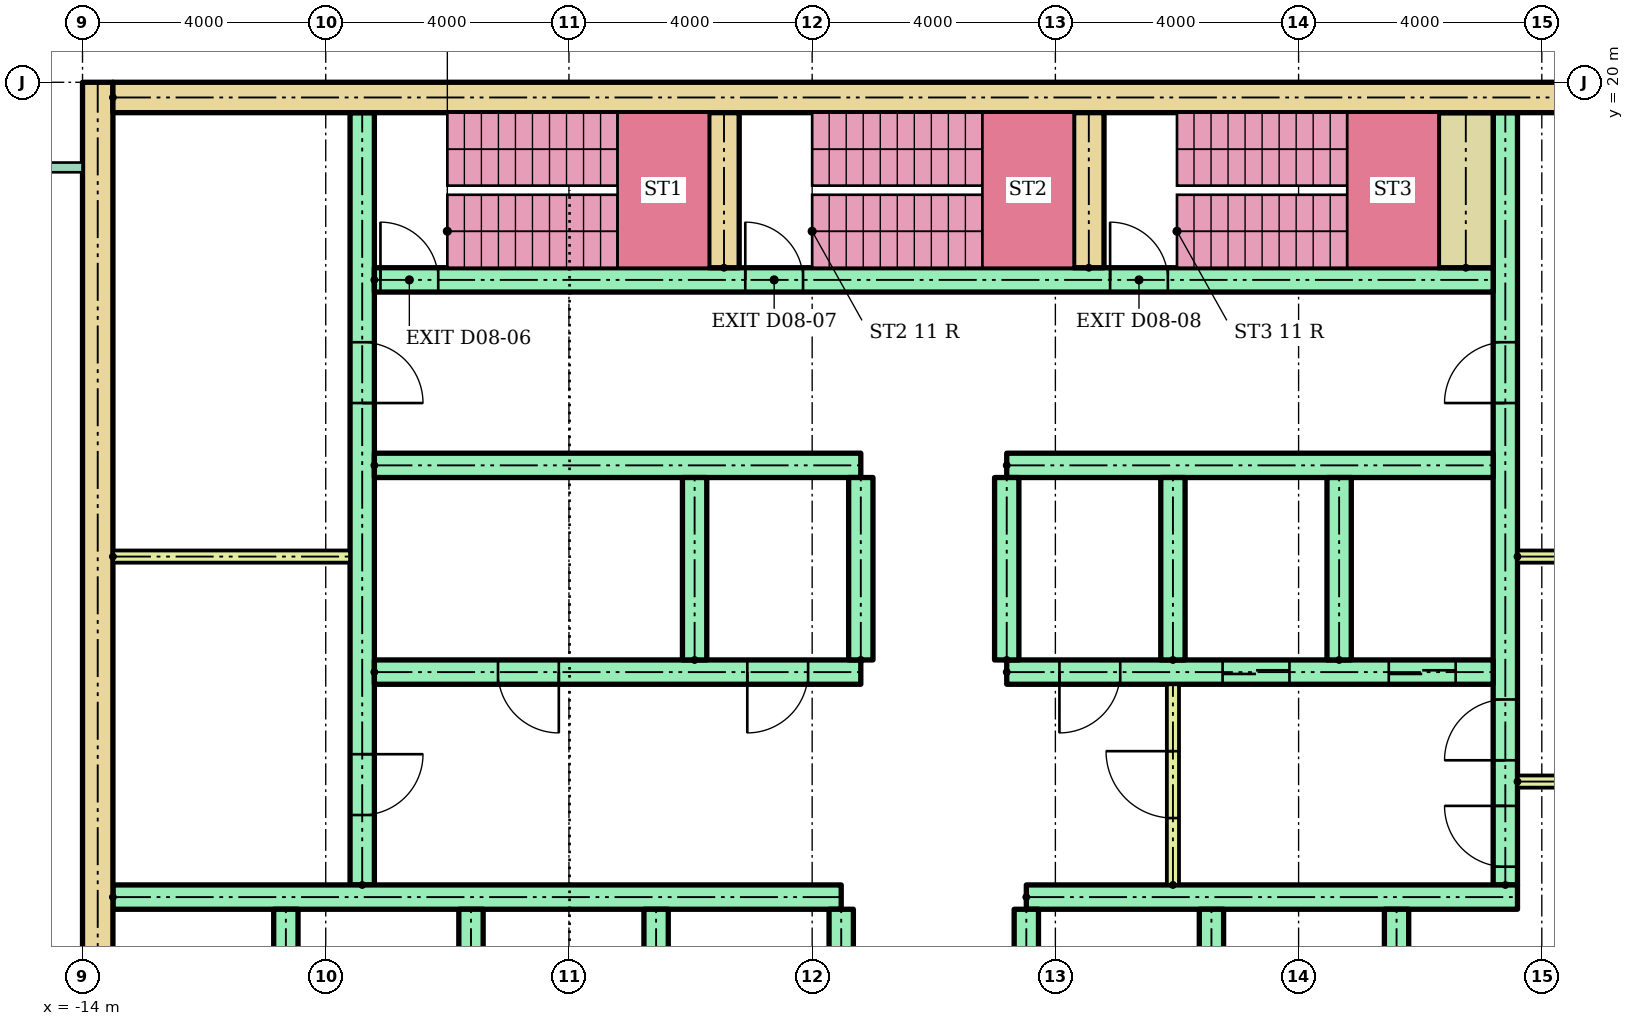
"""IFC4 building model, lengths in metres.
Left out: names, types, materials, properties, quantities, classifications, styles, units other than length and angle.
Written with IfcOpenShell. Run it as: python <this file> out.ifc"""

import sys

from ifc_helpers import new_model, si_unit, direction, frame, frame_2d, origin, place, context, subcontext, project, spatial, rectangle, extrude, element, fill, save


model = new_model("IFC4")
c1 = context("Model", 3, precision=1e-05, world=origin(), true_north=direction((0.0, 1.0)))
c2 = subcontext(c1, "Body", "Model", "MODEL_VIEW")
j1 = project(units=[si_unit("LENGTHUNIT", "METRE"), si_unit("PLANEANGLEUNIT", "RADIAN")], contexts=[c1])
p1 = place(None, origin())
s1 = spatial("IfcSite", under=j1, at=p1, CompositionType="ELEMENT")
p2 = place(p1, origin())
s2 = spatial("IfcBuilding", under=s1, at=p2, CompositionType="ELEMENT")
p3 = place(p2, frame((0.0, 0.0, 33.8)))
s3 = spatial("IfcBuildingStorey", under=s2, at=p3, CompositionType="ELEMENT", Elevation=33.8)
p4 = place(p3, frame((-13.75, 3.0, 0.0), z_axis=(0.0, 0.0, 1.0), x_axis=(0.0, 1.0, 0.0)))
e1 = element("IfcWall", 1, at=p4, inside=s3, PredefinedType="SHEAR", context=c2, shape_type="SweptSolid", body=[
    extrude(rectangle(XDim=17.0, YDim=0.5, at=frame_2d((8.5, 0.0))), origin(), (0.0, 0.0, 1.0), 3.6),
])
p5 = place(p3, frame((-13.5, 19.75, 0.0)))
e2 = element("IfcWall", 2, at=p5, inside=s3, PredefinedType="SHEAR", context=c2, shape_type="SweptSolid", body=[
    extrude(rectangle(XDim=27.0, YDim=0.5, at=frame_2d((13.5, 0.0))), origin(), (0.0, 0.0, 1.0), 3.6),
])
p6 = place(p3, frame((-9.4, 6.8, 0.0), z_axis=(0.0, 0.0, 1.0), x_axis=(0.0, 1.0, 0.0)))
e3 = element("IfcWall", 3, at=p6, inside=s3, PredefinedType="SHEAR", context=c2, shape_type="SweptSolid", body=[
    extrude(rectangle(XDim=12.7, YDim=0.4, at=frame_2d((6.35, 0.0))), origin(), (0.0, 0.0, 1.0), 3.6),
])
p7 = place(p6, frame((1.15, 0.0, 0.0)))
e4 = element("IfcOpeningElement", 4, at=p7, cuts=e3, PredefinedType="OPENING", context=c2, shape_type="SweptSolid", body=[
    extrude(rectangle(XDim=1.0, YDim=2.1, at=frame_2d((0.5, 1.05))), frame((0.0, 0.21, 0.0), z_axis=(0.0, -1.0, 0.0), x_axis=(1.0, 0.0, 0.0)), (0.0, 0.0, 1.0), 0.42),
])
p8 = place(p6, frame((7.925, 0.0, 0.0)))
e5 = element("IfcOpeningElement", 5, at=p8, cuts=e3, PredefinedType="OPENING", context=c2, shape_type="SweptSolid", body=[
    extrude(rectangle(XDim=1.0, YDim=2.1, at=frame_2d((0.5, 1.05))), frame((0.0, 0.21, 0.0), z_axis=(0.0, -1.0, 0.0), x_axis=(1.0, 0.0, 0.0)), (0.0, 0.0, 1.0), 0.42),
])
p9 = place(p3, frame((9.4, 6.8, 0.0), z_axis=(0.0, 0.0, 1.0), x_axis=(0.0, 1.0, 0.0)))
e6 = element("IfcWall", 6, at=p9, inside=s3, PredefinedType="SHEAR", context=c2, shape_type="SweptSolid", body=[
    extrude(rectangle(XDim=12.7, YDim=0.4, at=frame_2d((6.35, 0.0))), origin(), (0.0, 0.0, 1.0), 3.6),
])
p10 = place(p9, frame((0.3, 0.0, 0.0)))
e7 = element("IfcOpeningElement", 7, at=p10, cuts=e6, PredefinedType="OPENING", context=c2, shape_type="SweptSolid", body=[
    extrude(rectangle(XDim=1.0, YDim=2.1, at=frame_2d((0.5, 1.05))), frame((0.0, 0.21, 0.0), z_axis=(0.0, -1.0, 0.0), x_axis=(1.0, 0.0, 0.0)), (0.0, 0.0, 1.0), 0.42),
])
p11 = place(p9, frame((2.05, 0.0, 0.0)))
e8 = element("IfcOpeningElement", 8, at=p11, cuts=e6, PredefinedType="OPENING", context=c2, shape_type="SweptSolid", body=[
    extrude(rectangle(XDim=1.0, YDim=2.1, at=frame_2d((0.5, 1.05))), frame((0.0, 0.21, 0.0), z_axis=(0.0, -1.0, 0.0), x_axis=(1.0, 0.0, 0.0)), (0.0, 0.0, 1.0), 0.42),
])
p12 = place(p9, frame((7.925, 0.0, 0.0)))
e9 = element("IfcOpeningElement", 9, at=p12, cuts=e6, PredefinedType="OPENING", context=c2, shape_type="SweptSolid", body=[
    extrude(rectangle(XDim=1.0, YDim=2.1, at=frame_2d((0.5, 1.05))), frame((0.0, 0.21, 0.0), z_axis=(0.0, -1.0, 0.0), x_axis=(1.0, 0.0, 0.0)), (0.0, 0.0, 1.0), 0.42),
])
p13 = place(p3, frame((-13.5, 6.6, 0.0)))
e10 = element("IfcWall", 10, at=p13, inside=s3, PredefinedType="SHEAR", context=c2, shape_type="SweptSolid", body=[
    extrude(rectangle(XDim=11.978, YDim=0.4, at=frame_2d((5.989, 0.0))), origin(), (0.0, 0.0, 1.0), 3.6),
])
p14 = place(p3, frame((1.522, 6.6, 0.0)))
e11 = element("IfcWall", 11, at=p14, inside=s3, PredefinedType="SHEAR", context=c2, shape_type="SweptSolid", body=[
    extrude(rectangle(XDim=8.078, YDim=0.4, at=frame_2d((4.039, 0.0))), origin(), (0.0, 0.0, 1.0), 3.6),
])
for number, where, z_axis, x_axis in (
    (12, (-10.656, 3.4, 0.0), (0.0, 0.0, 1.0), (0.0, 1.0, 0.0)),
    (13, (-7.611, 3.4, 0.0), (0.0, 0.0, 1.0), (0.0, 1.0, 0.0)),
    (14, (-4.567, 3.4, 0.0), (0.0, 0.0, 1.0), (0.0, 1.0, 0.0)),
    (15, (-1.522, 3.4, 0.0), (0.0, 0.0, 1.0), (0.0, 1.0, 0.0)),
    (16, (1.522, 3.4, 0.0), (0.0, 0.0, 1.0), (0.0, 1.0, 0.0)),
    (17, (4.567, 3.4, 0.0), (0.0, 0.0, 1.0), (0.0, 1.0, 0.0)),
    (18, (7.611, 3.4, 0.0), (0.0, 0.0, 1.0), (0.0, 1.0, 0.0)),
):
    element("IfcWall", number, at=place(p3, frame(where, z_axis=z_axis, x_axis=x_axis)), inside=s3, PredefinedType="SHEAR", context=c2, shape_type="SweptSolid", body=[
        extrude(rectangle(XDim=3.0, YDim=0.4, at=frame_2d((1.5, 0.0))), origin(), (0.0, 0.0, 1.0), 3.6),
    ])
p15 = place(p3, frame((-9.2, 10.3, 0.0)))
e19 = element("IfcWall", 19, at=p15, inside=s3, PredefinedType="SHEAR", context=c2, shape_type="SweptSolid", body=[
    extrude(rectangle(XDim=8.0, YDim=0.4, at=frame_2d((4.0, 0.0))), origin(), (0.0, 0.0, 1.0), 3.6),
])
p16 = place(p15, frame((2.033, 0.0, 0.0)))
e20 = element("IfcOpeningElement", 20, at=p16, cuts=e19, PredefinedType="OPENING", context=c2, shape_type="SweptSolid", body=[
    extrude(rectangle(XDim=1.0, YDim=2.1, at=frame_2d((0.5, 1.05))), frame((0.0, 0.21, 0.0), z_axis=(0.0, -1.0, 0.0), x_axis=(1.0, 0.0, 0.0)), (0.0, 0.0, 1.0), 0.42),
])
p17 = place(p15, frame((6.133, 0.0, 0.0)))
e21 = element("IfcOpeningElement", 21, at=p17, cuts=e19, PredefinedType="OPENING", context=c2, shape_type="SweptSolid", body=[
    extrude(rectangle(XDim=1.0, YDim=2.1, at=frame_2d((0.5, 1.05))), frame((0.0, 0.21, 0.0), z_axis=(0.0, -1.0, 0.0), x_axis=(1.0, 0.0, 0.0)), (0.0, 0.0, 1.0), 0.42),
])
p18 = place(p3, frame((-9.2, 13.7, 0.0)))
e22 = element("IfcWall", 22, at=p18, inside=s3, PredefinedType="SHEAR", context=c2, shape_type="SweptSolid", body=[
    extrude(rectangle(XDim=8.0, YDim=0.4, at=frame_2d((4.0, 0.0))), origin(), (0.0, 0.0, 1.0), 3.6),
])
p19 = place(p3, frame((1.2, 10.3, 0.0)))
e23 = element("IfcWall", 23, at=p19, inside=s3, PredefinedType="SHEAR", context=c2, shape_type="SweptSolid", body=[
    extrude(rectangle(XDim=8.0, YDim=0.4, at=frame_2d((4.0, 0.0))), origin(), (0.0, 0.0, 1.0), 3.6),
])
p20 = place(p19, frame((3.55, 0.0, 0.0)))
e24 = element("IfcOpeningElement", 24, at=p20, cuts=e23, PredefinedType="OPENING", context=c2, shape_type="SweptSolid", body=[
    extrude(rectangle(XDim=1.1, YDim=2.1, at=frame_2d((0.55, 1.05))), frame((0.0, 0.21, 0.0), z_axis=(0.0, -1.0, 0.0), x_axis=(1.0, 0.0, 0.0)), (0.0, 0.0, 1.0), 0.42),
])
p21 = place(p19, frame((6.283, 0.0, 0.0)))
e25 = element("IfcOpeningElement", 25, at=p21, cuts=e23, PredefinedType="OPENING", context=c2, shape_type="SweptSolid", body=[
    extrude(rectangle(XDim=1.1, YDim=2.1, at=frame_2d((0.55, 1.05))), frame((0.0, 0.21, 0.0), z_axis=(0.0, -1.0, 0.0), x_axis=(1.0, 0.0, 0.0)), (0.0, 0.0, 1.0), 0.42),
])
p22 = place(p19, frame((0.867, 0.0, 0.0)))
e26 = element("IfcOpeningElement", 26, at=p22, cuts=e23, PredefinedType="OPENING", context=c2, shape_type="SweptSolid", body=[
    extrude(rectangle(XDim=1.0, YDim=2.1, at=frame_2d((0.5, 1.05))), frame((0.0, 0.21, 0.0), z_axis=(0.0, -1.0, 0.0), x_axis=(1.0, 0.0, 0.0)), (0.0, 0.0, 1.0), 0.42),
])
p23 = place(p3, frame((1.2, 13.7, 0.0)))
e27 = element("IfcWall", 27, at=p23, inside=s3, PredefinedType="SHEAR", context=c2, shape_type="SweptSolid", body=[
    extrude(rectangle(XDim=8.0, YDim=0.4, at=frame_2d((4.0, 0.0))), origin(), (0.0, 0.0, 1.0), 3.6),
])
for number, where, z_axis, x_axis in (
    (28, (-3.933, 10.5, 0.0), (0.0, 0.0, 1.0), (0.0, 1.0, 0.0)),
    (29, (-1.2, 10.5, 0.0), (0.0, 0.0, 1.0), (0.0, 1.0, 0.0)),
    (30, (1.2, 10.5, 0.0), (0.0, 0.0, 1.0), (0.0, 1.0, 0.0)),
    (31, (3.933, 10.5, 0.0), (0.0, 0.0, 1.0), (0.0, 1.0, 0.0)),
    (32, (6.667, 10.5, 0.0), (0.0, 0.0, 1.0), (0.0, 1.0, 0.0)),
):
    element("IfcWall", number, at=place(p3, frame(where, z_axis=z_axis, x_axis=x_axis)), inside=s3, PredefinedType="SHEAR", context=c2, shape_type="SweptSolid", body=[
        extrude(rectangle(XDim=3.0, YDim=0.4, at=frame_2d((1.5, 0.0))), origin(), (0.0, 0.0, 1.0), 3.6),
    ])
p24 = place(p3, frame((3.933, 6.8, 0.0), z_axis=(0.0, 0.0, 1.0), x_axis=(0.0, 1.0, 0.0)))
e33 = element("IfcWall", 33, at=p24, inside=s3, PredefinedType="PARTITIONING", context=c2, shape_type="SweptSolid", body=[
    extrude(rectangle(XDim=3.3, YDim=0.2, at=frame_2d((1.65, 0.0))), origin(), (0.0, 0.0, 1.0), 3.6),
])
p25 = place(p24, frame((1.1, 0.0, 0.0)))
e34 = element("IfcOpeningElement", 34, at=p25, cuts=e33, PredefinedType="OPENING", context=c2, shape_type="SweptSolid", body=[
    extrude(rectangle(XDim=1.1, YDim=2.1, at=frame_2d((0.55, 1.05))), frame((0.0, 0.11, 0.0), z_axis=(0.0, -1.0, 0.0), x_axis=(1.0, 0.0, 0.0)), (0.0, 0.0, 1.0), 0.22),
])
p26 = place(p3, frame((-9.2, 16.75, 0.0)))
e35 = element("IfcWall", 35, at=p26, inside=s3, PredefinedType="SHEAR", context=c2, shape_type="SweptSolid", body=[
    extrude(rectangle(XDim=18.4, YDim=0.4, at=frame_2d((9.2, 0.0))), origin(), (0.0, 0.0, 1.0), 3.6),
])
p27 = place(p26, frame((0.1, 0.0, 0.0)))
e36 = element("IfcOpeningElement", 36, at=p27, cuts=e35, PredefinedType="OPENING", context=c2, shape_type="SweptSolid", body=[
    extrude(rectangle(XDim=0.95, YDim=2.1, at=frame_2d((0.475, 1.05))), frame((0.0, 0.21, 0.0), z_axis=(0.0, -1.0, 0.0), x_axis=(1.0, 0.0, 0.0)), (0.0, 0.0, 1.0), 0.42),
])
p28 = place(p26, frame((6.1, 0.0, 0.0)))
e37 = element("IfcOpeningElement", 37, at=p28, cuts=e35, PredefinedType="OPENING", context=c2, shape_type="SweptSolid", body=[
    extrude(rectangle(XDim=0.95, YDim=2.1, at=frame_2d((0.475, 1.05))), frame((0.0, 0.21, 0.0), z_axis=(0.0, -1.0, 0.0), x_axis=(1.0, 0.0, 0.0)), (0.0, 0.0, 1.0), 0.42),
])
p29 = place(p26, frame((12.1, 0.0, 0.0)))
e38 = element("IfcOpeningElement", 38, at=p29, cuts=e35, PredefinedType="OPENING", context=c2, shape_type="SweptSolid", body=[
    extrude(rectangle(XDim=0.95, YDim=2.1, at=frame_2d((0.475, 1.05))), frame((0.0, 0.21, 0.0), z_axis=(0.0, -1.0, 0.0), x_axis=(1.0, 0.0, 0.0)), (0.0, 0.0, 1.0), 0.42),
])
for number, where, z_axis, x_axis in (
    (39, (-3.45, 16.95, 0.0), (0.0, 0.0, 1.0), (0.0, 1.0, 0.0)),
    (40, (2.55, 16.95, 0.0), (0.0, 0.0, 1.0), (0.0, 1.0, 0.0)),
):
    element("IfcWall", number, at=place(p3, frame(where, z_axis=z_axis, x_axis=x_axis)), inside=s3, PredefinedType="SHEAR", context=c2, shape_type="SweptSolid", body=[
        extrude(rectangle(XDim=2.55, YDim=0.5, at=frame_2d((1.275, 0.0))), origin(), (0.0, 0.0, 1.0), 3.6),
    ])
p30 = place(p3, frame((8.75, 16.95, 0.0), z_axis=(0.0, 0.0, 1.0), x_axis=(0.0, 1.0, 0.0)))
e41 = element("IfcWall", 41, at=p30, inside=s3, PredefinedType="SHEAR", context=c2, shape_type="SweptSolid", body=[
    extrude(rectangle(XDim=2.55, YDim=0.9, at=frame_2d((1.275, 0.0))), origin(), (0.0, 0.0, 1.0), 3.6),
])
for number, where in (
    (42, (-13.5, 12.2, 0.0)),
    (43, (9.6, 8.5, 0.0)),
    (44, (9.6, 12.2, 0.0)),
):
    element("IfcWall", number, at=place(p3, frame(where)), inside=s3, PredefinedType="PARTITIONING", context=c2, shape_type="SweptSolid", body=[
        extrude(rectangle(XDim=3.9, YDim=0.2, at=frame_2d((1.95, 0.0))), origin(), (0.0, 0.0, 1.0), 3.6),
    ])
p31 = place(p20, origin())
e45 = element("IfcDoor", 45, at=p31, inside=s3, OperationType="SLIDING_TO_LEFT", PredefinedType="DOOR", context=c2, shape_type="SweptSolid", body=[
    extrude(rectangle(XDim=1.1, YDim=2.1, at=frame_2d((0.55, 1.05))), frame((0.0, 0.025, 0.0), z_axis=(0.0, -1.0, 0.0), x_axis=(1.0, 0.0, 0.0)), (0.0, 0.0, 1.0), 0.05),
])
fill(e24, e45)
p32 = place(p21, origin())
e46 = element("IfcDoor", 46, at=p32, inside=s3, OperationType="SLIDING_TO_LEFT", PredefinedType="DOOR", context=c2, shape_type="SweptSolid", body=[
    extrude(rectangle(XDim=1.1, YDim=2.1, at=frame_2d((0.55, 1.05))), frame((0.0, 0.025, 0.0), z_axis=(0.0, -1.0, 0.0), x_axis=(1.0, 0.0, 0.0)), (0.0, 0.0, 1.0), 0.05),
])
fill(e25, e46)
p33 = place(p16, frame((1.0, 0.0, 0.0), z_axis=(0.0, 0.0, 1.0), x_axis=(-1.0, 0.0, 0.0)))
e47 = element("IfcDoor", 47, at=p33, inside=s3, OperationType="SINGLE_SWING_RIGHT", PredefinedType="DOOR", context=c2, shape_type="SweptSolid", body=[
    extrude(rectangle(XDim=1.0, YDim=2.1, at=frame_2d((0.5, 1.05))), frame((0.0, 0.025, 0.0), z_axis=(0.0, -1.0, 0.0), x_axis=(1.0, 0.0, 0.0)), (0.0, 0.0, 1.0), 0.05),
])
fill(e20, e47)
p34 = place(p17, frame((1.0, 0.0, 0.0), z_axis=(0.0, 0.0, 1.0), x_axis=(-1.0, 0.0, 0.0)))
e48 = element("IfcDoor", 48, at=p34, inside=s3, OperationType="SINGLE_SWING_LEFT", PredefinedType="DOOR", context=c2, shape_type="SweptSolid", body=[
    extrude(rectangle(XDim=1.0, YDim=2.1, at=frame_2d((0.5, 1.05))), frame((0.0, 0.025, 0.0), z_axis=(0.0, -1.0, 0.0), x_axis=(1.0, 0.0, 0.0)), (0.0, 0.0, 1.0), 0.05),
])
fill(e21, e48)
p35 = place(p22, frame((1.0, 0.0, 0.0), z_axis=(0.0, 0.0, 1.0), x_axis=(-1.0, 0.0, 0.0)))
e49 = element("IfcDoor", 49, at=p35, inside=s3, OperationType="SINGLE_SWING_LEFT", PredefinedType="DOOR", context=c2, shape_type="SweptSolid", body=[
    extrude(rectangle(XDim=1.0, YDim=2.1, at=frame_2d((0.5, 1.05))), frame((0.0, 0.025, 0.0), z_axis=(0.0, -1.0, 0.0), x_axis=(1.0, 0.0, 0.0)), (0.0, 0.0, 1.0), 0.05),
])
fill(e26, e49)
p36 = place(p25, origin())
e50 = element("IfcDoor", 50, at=p36, inside=s3, OperationType="SINGLE_SWING_RIGHT", PredefinedType="DOOR", context=c2, shape_type="SweptSolid", body=[
    extrude(rectangle(XDim=1.1, YDim=2.1, at=frame_2d((0.55, 1.05))), frame((0.0, 0.025, 0.0), z_axis=(0.0, -1.0, 0.0), x_axis=(1.0, 0.0, 0.0)), (0.0, 0.0, 1.0), 0.05),
])
fill(e34, e50)
p37 = place(p27, origin())
e51 = element("IfcDoor", 51, at=p37, inside=s3, OperationType="SINGLE_SWING_LEFT", PredefinedType="DOOR", context=c2, shape_type="SweptSolid", body=[
    extrude(rectangle(XDim=0.95, YDim=2.1, at=frame_2d((0.475, 1.05))), frame((0.0, 0.025, 0.0), z_axis=(0.0, -1.0, 0.0), x_axis=(1.0, 0.0, 0.0)), (0.0, 0.0, 1.0), 0.05),
])
fill(e36, e51)
p38 = place(p28, origin())
e52 = element("IfcDoor", 52, at=p38, inside=s3, OperationType="SINGLE_SWING_LEFT", PredefinedType="DOOR", context=c2, shape_type="SweptSolid", body=[
    extrude(rectangle(XDim=0.95, YDim=2.1, at=frame_2d((0.475, 1.05))), frame((0.0, 0.025, 0.0), z_axis=(0.0, -1.0, 0.0), x_axis=(1.0, 0.0, 0.0)), (0.0, 0.0, 1.0), 0.05),
])
fill(e37, e52)
p39 = place(p29, origin())
e53 = element("IfcDoor", 53, at=p39, inside=s3, OperationType="SINGLE_SWING_LEFT", PredefinedType="DOOR", context=c2, shape_type="SweptSolid", body=[
    extrude(rectangle(XDim=0.95, YDim=2.1, at=frame_2d((0.475, 1.05))), frame((0.0, 0.025, 0.0), z_axis=(0.0, -1.0, 0.0), x_axis=(1.0, 0.0, 0.0)), (0.0, 0.0, 1.0), 0.05),
])
fill(e38, e53)
p40 = place(p7, frame((1.0, 0.0, 0.0), z_axis=(0.0, 0.0, 1.0), x_axis=(-1.0, 0.0, 0.0)))
e54 = element("IfcDoor", 54, at=p40, inside=s3, OperationType="SINGLE_SWING_RIGHT", PredefinedType="DOOR", context=c2, shape_type="SweptSolid", body=[
    extrude(rectangle(XDim=1.0, YDim=2.1, at=frame_2d((0.5, 1.05))), frame((0.0, 0.025, 0.0), z_axis=(0.0, -1.0, 0.0), x_axis=(1.0, 0.0, 0.0)), (0.0, 0.0, 1.0), 0.05),
])
fill(e4, e54)
p41 = place(p8, frame((1.0, 0.0, 0.0), z_axis=(0.0, 0.0, 1.0), x_axis=(-1.0, 0.0, 0.0)))
e55 = element("IfcDoor", 55, at=p41, inside=s3, OperationType="SINGLE_SWING_LEFT", PredefinedType="DOOR", context=c2, shape_type="SweptSolid", body=[
    extrude(rectangle(XDim=1.0, YDim=2.1, at=frame_2d((0.5, 1.05))), frame((0.0, 0.025, 0.0), z_axis=(0.0, -1.0, 0.0), x_axis=(1.0, 0.0, 0.0)), (0.0, 0.0, 1.0), 0.05),
])
fill(e5, e55)
p42 = place(p10, origin())
e56 = element("IfcDoor", 56, at=p42, inside=s3, OperationType="SINGLE_SWING_RIGHT", PredefinedType="DOOR", context=c2, shape_type="SweptSolid", body=[
    extrude(rectangle(XDim=1.0, YDim=2.1, at=frame_2d((0.5, 1.05))), frame((0.0, 0.025, 0.0), z_axis=(0.0, -1.0, 0.0), x_axis=(1.0, 0.0, 0.0)), (0.0, 0.0, 1.0), 0.05),
])
fill(e7, e56)
p43 = place(p11, origin())
e57 = element("IfcDoor", 57, at=p43, inside=s3, OperationType="SINGLE_SWING_LEFT", PredefinedType="DOOR", context=c2, shape_type="SweptSolid", body=[
    extrude(rectangle(XDim=1.0, YDim=2.1, at=frame_2d((0.5, 1.05))), frame((0.0, 0.025, 0.0), z_axis=(0.0, -1.0, 0.0), x_axis=(1.0, 0.0, 0.0)), (0.0, 0.0, 1.0), 0.05),
])
fill(e8, e57)
p44 = place(p12, origin())
e58 = element("IfcDoor", 58, at=p44, inside=s3, OperationType="SINGLE_SWING_LEFT", PredefinedType="DOOR", context=c2, shape_type="SweptSolid", body=[
    extrude(rectangle(XDim=1.0, YDim=2.1, at=frame_2d((0.5, 1.05))), frame((0.0, 0.025, 0.0), z_axis=(0.0, -1.0, 0.0), x_axis=(1.0, 0.0, 0.0)), (0.0, 0.0, 1.0), 0.05),
])
fill(e9, e58)
save(model, sys.argv[1])
